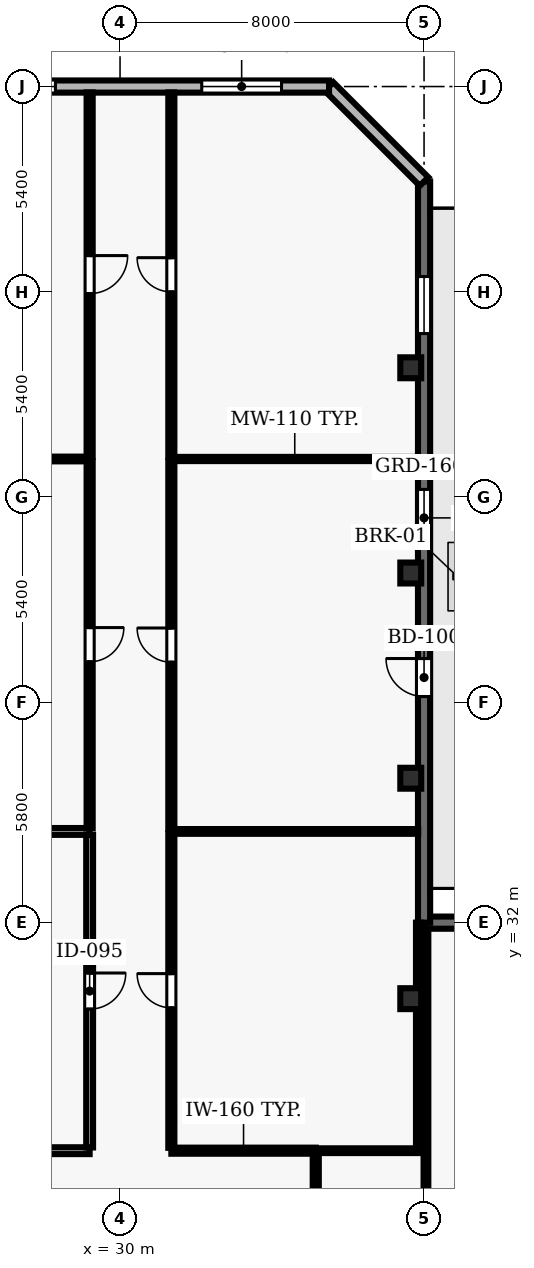
"""IFC4 building model, lengths in metres.
Left out: names, types, materials, properties, quantities, classifications, styles, units other than length and angle.
Written with IfcOpenShell. Run it as: python <this file> out.ifc"""

import sys

from ifc_helpers import new_model, si_unit, direction, frame, frame_2d, origin, origin_2d, place, context, subcontext, project, spatial, rectangle, hollow_rectangle, extrude, element, fill, save


model = new_model("IFC4")
c1 = context("Model", 3, precision=1e-05, world=origin(), true_north=direction((0.0, 1.0)))
c2 = subcontext(c1, "Body", "Model", "MODEL_VIEW")
j1 = project(units=[si_unit("LENGTHUNIT", "METRE"), si_unit("PLANEANGLEUNIT", "RADIAN")], contexts=[c1])
p1 = place(None, origin())
s1 = spatial("IfcSite", under=j1, at=p1, CompositionType="ELEMENT")
p2 = place(p1, origin())
s2 = spatial("IfcBuilding", under=s1, at=p2, CompositionType="ELEMENT")
p3 = place(p2, frame((0.0, 0.0, 26.0)))
s3 = spatial("IfcBuildingStorey", under=s2, at=p3, CompositionType="ELEMENT", Elevation=26.0)
for number, where, z_axis, x_axis in (
    (1, (37.65, 30.0, 0.0), (0.0, 0.0, 1.0), (1.0, 0.0, 0.0)),
    (2, (37.65, 35.8, 0.0), (0.0, 0.0, 1.0), (1.0, 0.0, 0.0)),
    (3, (37.65, 41.2, 0.0), (0.0, 0.0, 1.0), (1.0, 0.0, 0.0)),
    (4, (37.65, 46.6, 0.0), (0.0, 0.0, 1.0), (1.0, 0.0, 0.0)),
):
    element("IfcColumn", number, at=place(p3, frame(where, z_axis=z_axis, x_axis=x_axis)), inside=s3, PredefinedType="COLUMN", context=c2, shape_type="SweptSolid", body=[
        extrude(hollow_rectangle(XDim=0.55, YDim=0.55, WallThickness=0.025, at=origin_2d()), origin(), (0.0, 0.0, 1.0), 5.0),
    ])
p4 = place(p3, frame((52.8, 32.0, 0.0), z_axis=(0.0, 0.0, 1.0), x_axis=(-1.0, 0.0, 0.0)))
e5 = element("IfcWall", 5, at=p4, inside=s3, PredefinedType="SOLIDWALL", context=c2, shape_type="SweptSolid", body=[
    extrude(rectangle(XDim=14.8, YDim=0.32, at=frame_2d((7.4, 0.0))), origin(), (0.0, 0.0, 1.0), 4.79),
])
p5 = place(p4, frame((3.1, 0.0, 0.9)))
e6 = element("IfcOpeningElement", 6, at=p5, cuts=e5, PredefinedType="OPENING", context=c2, shape_type="SweptSolid", body=[
    extrude(rectangle(XDim=1.2, YDim=1.6, at=frame_2d((0.6, 0.8))), frame((0.0, 0.17, 0.0), z_axis=(0.0, -1.0, 0.0), x_axis=(1.0, 0.0, 0.0)), (0.0, 0.0, 1.0), 0.34),
])
p6 = place(p4, frame((10.5, 0.0, 0.9)))
e7 = element("IfcOpeningElement", 7, at=p6, cuts=e5, PredefinedType="OPENING", context=c2, shape_type="SweptSolid", body=[
    extrude(rectangle(XDim=1.2, YDim=1.6, at=frame_2d((0.6, 0.8))), frame((0.0, 0.17, 0.0), z_axis=(0.0, -1.0, 0.0), x_axis=(1.0, 0.0, 0.0)), (0.0, 0.0, 1.0), 0.34),
])
p7 = place(p3, frame((38.0, 32.0, 0.0), z_axis=(0.0, 0.0, 1.0), x_axis=(0.0, 1.0, 0.0)))
e8 = element("IfcWall", 8, at=p7, inside=s3, PredefinedType="SOLIDWALL", context=c2, shape_type="SweptSolid", body=[
    extrude(rectangle(XDim=19.5, YDim=0.32, at=frame_2d((9.75, 0.0))), origin(), (0.0, 0.0, 1.0), 4.79),
])
p8 = place(p7, frame((5.95, 0.0, 0.0)))
e9 = element("IfcOpeningElement", 9, at=p8, cuts=e8, PredefinedType="OPENING", context=c2, shape_type="SweptSolid", body=[
    extrude(rectangle(XDim=1.0, YDim=2.2, at=frame_2d((0.5, 1.1))), frame((0.0, 0.17, 0.0), z_axis=(0.0, -1.0, 0.0), x_axis=(1.0, 0.0, 0.0)), (0.0, 0.0, 1.0), 0.34),
])
p9 = place(p7, frame((9.9, 0.0, 0.9)))
e10 = element("IfcOpeningElement", 10, at=p9, cuts=e8, PredefinedType="OPENING", context=c2, shape_type="SweptSolid", body=[
    extrude(rectangle(XDim=1.5, YDim=1.6, at=frame_2d((0.75, 0.8))), frame((0.0, 0.17, 0.0), z_axis=(0.0, -1.0, 0.0), x_axis=(1.0, 0.0, 0.0)), (0.0, 0.0, 1.0), 0.34),
])
p10 = place(p7, frame((15.5, 0.0, 0.9)))
e11 = element("IfcOpeningElement", 11, at=p10, cuts=e8, PredefinedType="OPENING", context=c2, shape_type="SweptSolid", body=[
    extrude(rectangle(XDim=1.5, YDim=1.6, at=frame_2d((0.75, 0.8))), frame((0.0, 0.17, 0.0), z_axis=(0.0, -1.0, 0.0), x_axis=(1.0, 0.0, 0.0)), (0.0, 0.0, 1.0), 0.34),
])
p11 = place(p3, frame((38.0, 51.5, 0.0), z_axis=(0.0, 0.0, 1.0), x_axis=(-0.707106781187, 0.707106781187, 0.0)))
e12 = element("IfcWall", 12, at=p11, inside=s3, PredefinedType="SOLIDWALL", context=c2, shape_type="SweptSolid", body=[
    extrude(rectangle(XDim=3.536, YDim=0.32, at=frame_2d((1.768, 0.0))), origin(), (0.0, 0.0, 1.0), 4.79),
])
p12 = place(p3, frame((35.5, 54.0, 0.0), z_axis=(0.0, 0.0, 1.0), x_axis=(-1.0, 0.0, 0.0)))
e13 = element("IfcWall", 13, at=p12, inside=s3, PredefinedType="SOLIDWALL", context=c2, shape_type="SweptSolid", body=[
    extrude(rectangle(XDim=11.0, YDim=0.32, at=frame_2d((5.5, 0.0))), origin(), (0.0, 0.0, 1.0), 4.79),
])
p13 = place(p12, frame((1.25, 0.0, 0.9)))
e14 = element("IfcOpeningElement", 14, at=p13, cuts=e13, PredefinedType="OPENING", context=c2, shape_type="SweptSolid", body=[
    extrude(rectangle(XDim=2.1, YDim=1.6, at=frame_2d((1.05, 0.8))), frame((0.0, 0.17, 0.0), z_axis=(0.0, -1.0, 0.0), x_axis=(1.0, 0.0, 0.0)), (0.0, 0.0, 1.0), 0.34),
])
p14 = place(p12, frame((7.2, 0.0, 0.9)))
e15 = element("IfcOpeningElement", 15, at=p14, cuts=e13, PredefinedType="OPENING", context=c2, shape_type="SweptSolid", body=[
    extrude(rectangle(XDim=2.1, YDim=1.6, at=frame_2d((1.05, 0.8))), frame((0.0, 0.17, 0.0), z_axis=(0.0, -1.0, 0.0), x_axis=(1.0, 0.0, 0.0)), (0.0, 0.0, 1.0), 0.34),
])
for number, where, z_axis, x_axis in (
    (16, (29.2, 26.0, 0.0), (0.0, 0.0, 1.0), (-1.0, 0.0, 0.0)),
    (17, (29.2, 34.4, 0.0), (0.0, 0.0, 1.0), (-1.0, 0.0, 0.0)),
):
    element("IfcWall", number, at=place(p3, frame(where, z_axis=z_axis, x_axis=x_axis)), inside=s3, PredefinedType="PARTITIONING", context=c2, shape_type="SweptSolid", body=[
        extrude(rectangle(XDim=7.045, YDim=0.18, at=frame_2d((3.522, 0.0))), origin(), (0.0, 0.0, 1.0), 4.79),
    ])
p15 = place(p3, frame((29.2, 44.2, 0.0), z_axis=(0.0, 0.0, 1.0), x_axis=(-1.0, 0.0, 0.0)))
e18 = element("IfcWall", 18, at=p15, inside=s3, PredefinedType="PARTITIONING", context=c2, shape_type="SweptSolid", body=[
    extrude(rectangle(XDim=7.045, YDim=0.125, at=frame_2d((3.522, 0.0))), origin(), (0.0, 0.0, 1.0), 4.377),
])
p16 = place(p3, frame((35.15, 26.0, 0.0), z_axis=(0.0, 0.0, 1.0), x_axis=(-1.0, 0.0, 0.0)))
e19 = element("IfcWall", 19, at=p16, inside=s3, PredefinedType="PARTITIONING", context=c2, shape_type="SweptSolid", body=[
    extrude(rectangle(XDim=3.8, YDim=0.16, at=frame_2d((1.9, 0.0))), origin(), (0.0, 0.0, 1.0), 4.79),
])
p17 = place(p3, frame((35.15, 26.0, 0.0), z_axis=(0.0, 0.0, 1.0), x_axis=(1.0, 0.0, 0.0)))
e20 = element("IfcWall", 20, at=p17, inside=s3, PredefinedType="PARTITIONING", context=c2, shape_type="SweptSolid", body=[
    extrude(rectangle(XDim=2.7, YDim=0.125, at=frame_2d((1.35, 0.0))), origin(), (0.0, 0.0, 1.0), 4.79),
])
p18 = place(p3, frame((37.845, 34.4, 0.0), z_axis=(0.0, 0.0, 1.0), x_axis=(-1.0, 0.0, 0.0)))
e21 = element("IfcWall", 21, at=p18, inside=s3, PredefinedType="PARTITIONING", context=c2, shape_type="SweptSolid", body=[
    extrude(rectangle(XDim=6.495, YDim=0.125, at=frame_2d((3.248, 0.0))), origin(), (0.0, 0.0, 1.0), 4.79),
])
p19 = place(p3, frame((37.845, 44.2, 0.0), z_axis=(0.0, 0.0, 1.0), x_axis=(-1.0, 0.0, 0.0)))
e22 = element("IfcWall", 22, at=p19, inside=s3, PredefinedType="MOVABLE", context=c2, shape_type="SweptSolid", body=[
    extrude(rectangle(XDim=6.495, YDim=0.11, at=frame_2d((3.248, 0.0))), origin(), (0.0, 0.0, 1.0), 4.377),
])
p20 = place(p3, frame((29.2, 34.315, 0.0), z_axis=(0.0, 0.0, 1.0), x_axis=(0.0, -1.0, 0.0)))
e23 = element("IfcWall", 23, at=p20, inside=s3, PredefinedType="PARTITIONING", context=c2, shape_type="SweptSolid", body=[
    extrude(rectangle(XDim=8.23, YDim=0.18, at=frame_2d((4.115, 0.0))), origin(), (0.0, 0.0, 1.0), 4.79),
])
p21 = place(p20, frame((3.64, 0.0, 0.0)))
e24 = element("IfcOpeningElement", 24, at=p21, cuts=e23, PredefinedType="OPENING", context=c2, shape_type="SweptSolid", body=[
    extrude(rectangle(XDim=0.95, YDim=2.1, at=frame_2d((0.475, 1.05))), frame((0.0, 0.1, 0.0), z_axis=(0.0, -1.0, 0.0), x_axis=(1.0, 0.0, 0.0)), (0.0, 0.0, 1.0), 0.2),
])
p22 = place(p3, frame((29.2, 44.143, 0.0), z_axis=(0.0, 0.0, 1.0), x_axis=(0.0, -1.0, 0.0)))
e25 = element("IfcWall", 25, at=p22, inside=s3, PredefinedType="PARTITIONING", context=c2, shape_type="SweptSolid", body=[
    extrude(rectangle(XDim=9.658, YDim=0.16, at=frame_2d((4.829, 0.0))), origin(), (0.0, 0.0, 1.0), 4.79),
])
p23 = place(p22, frame((4.379, 0.0, 0.0)))
e26 = element("IfcOpeningElement", 26, at=p23, cuts=e25, PredefinedType="OPENING", context=c2, shape_type="SweptSolid", body=[
    extrude(rectangle(XDim=0.9, YDim=2.1, at=frame_2d((0.45, 1.05))), frame((0.0, 0.09, 0.0), z_axis=(0.0, -1.0, 0.0), x_axis=(1.0, 0.0, 0.0)), (0.0, 0.0, 1.0), 0.18),
])
p24 = place(p3, frame((29.2, 53.845, 0.0), z_axis=(0.0, 0.0, 1.0), x_axis=(0.0, -1.0, 0.0)))
e27 = element("IfcWall", 27, at=p24, inside=s3, PredefinedType="PARTITIONING", context=c2, shape_type="SweptSolid", body=[
    extrude(rectangle(XDim=9.587, YDim=0.16, at=frame_2d((4.793, 0.0))), origin(), (0.0, 0.0, 1.0), 4.79),
])
p25 = place(p24, frame((4.293, 0.0, 0.0)))
e28 = element("IfcOpeningElement", 28, at=p25, cuts=e27, PredefinedType="OPENING", context=c2, shape_type="SweptSolid", body=[
    extrude(rectangle(XDim=1.0, YDim=2.1, at=frame_2d((0.5, 1.05))), frame((0.0, 0.09, 0.0), z_axis=(0.0, -1.0, 0.0), x_axis=(1.0, 0.0, 0.0)), (0.0, 0.0, 1.0), 0.18),
])
p26 = place(p3, frame((31.35, 26.075, 0.0), z_axis=(0.0, 0.0, 1.0), x_axis=(0.0, 1.0, 0.0)))
e29 = element("IfcWall", 29, at=p26, inside=s3, PredefinedType="PARTITIONING", context=c2, shape_type="SweptSolid", body=[
    extrude(rectangle(XDim=8.268, YDim=0.16, at=frame_2d((4.134, 0.0))), origin(), (0.0, 0.0, 1.0), 4.79),
])
p27 = place(p26, frame((3.684, 0.0, 0.0)))
e30 = element("IfcOpeningElement", 30, at=p27, cuts=e29, PredefinedType="OPENING", context=c2, shape_type="SweptSolid", body=[
    extrude(rectangle(XDim=0.9, YDim=2.1, at=frame_2d((0.45, 1.05))), frame((0.0, 0.09, 0.0), z_axis=(0.0, -1.0, 0.0), x_axis=(1.0, 0.0, 0.0)), (0.0, 0.0, 1.0), 0.18),
])
p28 = place(p3, frame((31.35, 34.457, 0.0), z_axis=(0.0, 0.0, 1.0), x_axis=(0.0, 1.0, 0.0)))
e31 = element("IfcWall", 31, at=p28, inside=s3, PredefinedType="PARTITIONING", context=c2, shape_type="SweptSolid", body=[
    extrude(rectangle(XDim=9.693, YDim=0.16, at=frame_2d((4.846, 0.0))), origin(), (0.0, 0.0, 1.0), 4.79),
])
p29 = place(p28, frame((4.396, 0.0, 0.0)))
e32 = element("IfcOpeningElement", 32, at=p29, cuts=e31, PredefinedType="OPENING", context=c2, shape_type="SweptSolid", body=[
    extrude(rectangle(XDim=0.9, YDim=2.1, at=frame_2d((0.45, 1.05))), frame((0.0, 0.09, 0.0), z_axis=(0.0, -1.0, 0.0), x_axis=(1.0, 0.0, 0.0)), (0.0, 0.0, 1.0), 0.18),
])
p30 = place(p3, frame((31.35, 44.25, 0.0), z_axis=(0.0, 0.0, 1.0), x_axis=(0.0, 1.0, 0.0)))
e33 = element("IfcWall", 33, at=p30, inside=s3, PredefinedType="PARTITIONING", context=c2, shape_type="SweptSolid", body=[
    extrude(rectangle(XDim=9.595, YDim=0.16, at=frame_2d((4.797, 0.0))), origin(), (0.0, 0.0, 1.0), 4.79),
])
p31 = place(p30, frame((4.347, 0.0, 0.0)))
e34 = element("IfcOpeningElement", 34, at=p31, cuts=e33, PredefinedType="OPENING", context=c2, shape_type="SweptSolid", body=[
    extrude(rectangle(XDim=0.9, YDim=2.1, at=frame_2d((0.45, 1.05))), frame((0.0, 0.09, 0.0), z_axis=(0.0, -1.0, 0.0), x_axis=(1.0, 0.0, 0.0)), (0.0, 0.0, 1.0), 0.18),
])
p32 = place(p3, frame((35.15, 24.07, 0.0), z_axis=(0.0, 0.0, 1.0), x_axis=(0.0, 1.0, 0.0)))
e35 = element("IfcWall", 35, at=p32, inside=s3, PredefinedType="PARTITIONING", context=c2, shape_type="SweptSolid", body=[
    extrude(rectangle(XDim=1.855, YDim=0.16, at=frame_2d((0.927, 0.0))), origin(), (0.0, 0.0, 1.0), 4.79),
])
p33 = place(p3, frame((37.85, 26.058, 0.0), z_axis=(0.0, 0.0, 1.0), x_axis=(0.0, 1.0, 0.0)))
e36 = element("IfcWall", 36, at=p33, inside=s3, PredefinedType="PARTITIONING", context=c2, shape_type="SweptSolid", body=[
    extrude(rectangle(XDim=5.942, YDim=0.125, at=frame_2d((2.971, 0.0))), origin(), (0.0, 0.0, 1.0), 4.155),
])
p34 = place(p3, frame((38.05, 31.845, 0.0), z_axis=(0.0, 0.0, 1.0), x_axis=(0.0, -1.0, 0.0)))
e37 = element("IfcWall", 37, at=p34, inside=s3, PredefinedType="PARTITIONING", context=c2, shape_type="SweptSolid", body=[
    extrude(rectangle(XDim=7.795, YDim=0.125, at=frame_2d((3.897, 0.0))), origin(), (0.0, 0.0, 1.0), 4.155),
])
p35 = place(p8, origin())
e38 = element("IfcDoor", 38, at=p35, inside=s3, OperationType="SINGLE_SWING_RIGHT", PredefinedType="DOOR", context=c2, shape_type="SweptSolid", body=[
    extrude(rectangle(XDim=1.0, YDim=2.2, at=frame_2d((0.5, 1.1))), frame((0.0, 0.025, 0.0), z_axis=(0.0, -1.0, 0.0), x_axis=(1.0, 0.0, 0.0)), (0.0, 0.0, 1.0), 0.05),
])
fill(e9, e38)
p36 = place(p9, origin())
e39 = element("IfcWindow", 39, at=p36, inside=s3, PartitioningType="SINGLE_PANEL", PredefinedType="WINDOW", context=c2, shape_type="SweptSolid", body=[
    extrude(rectangle(XDim=1.5, YDim=1.6, at=frame_2d((0.75, 0.8))), frame((0.0, 0.03, 0.0), z_axis=(0.0, -1.0, 0.0), x_axis=(1.0, 0.0, 0.0)), (0.0, 0.0, 1.0), 0.06),
])
fill(e10, e39)
p37 = place(p10, origin())
e40 = element("IfcWindow", 40, at=p37, inside=s3, PartitioningType="SINGLE_PANEL", PredefinedType="WINDOW", context=c2, shape_type="SweptSolid", body=[
    extrude(rectangle(XDim=1.5, YDim=1.6, at=frame_2d((0.75, 0.8))), frame((0.0, 0.03, 0.0), z_axis=(0.0, -1.0, 0.0), x_axis=(1.0, 0.0, 0.0)), (0.0, 0.0, 1.0), 0.06),
])
fill(e11, e40)
p38 = place(p13, origin())
e41 = element("IfcWindow", 41, at=p38, inside=s3, PartitioningType="SINGLE_PANEL", PredefinedType="WINDOW", context=c2, shape_type="SweptSolid", body=[
    extrude(rectangle(XDim=2.1, YDim=1.6, at=frame_2d((1.05, 0.8))), frame((0.0, 0.03, 0.0), z_axis=(0.0, -1.0, 0.0), x_axis=(1.0, 0.0, 0.0)), (0.0, 0.0, 1.0), 0.06),
])
fill(e14, e41)
p39 = place(p14, origin())
e42 = element("IfcWindow", 42, at=p39, inside=s3, PartitioningType="SINGLE_PANEL", PredefinedType="WINDOW", context=c2, shape_type="SweptSolid", body=[
    extrude(rectangle(XDim=2.1, YDim=1.6, at=frame_2d((1.05, 0.8))), frame((0.0, 0.03, 0.0), z_axis=(0.0, -1.0, 0.0), x_axis=(1.0, 0.0, 0.0)), (0.0, 0.0, 1.0), 0.06),
])
fill(e15, e42)
p40 = place(p21, origin())
e43 = element("IfcDoor", 43, at=p40, inside=s3, OperationType="SINGLE_SWING_LEFT", PredefinedType="DOOR", context=c2, shape_type="SweptSolid", body=[
    extrude(rectangle(XDim=0.95, YDim=2.1, at=frame_2d((0.475, 1.05))), frame((0.0, 0.025, 0.0), z_axis=(0.0, -1.0, 0.0), x_axis=(1.0, 0.0, 0.0)), (0.0, 0.0, 1.0), 0.05),
])
fill(e24, e43)
p41 = place(p27, origin())
e44 = element("IfcDoor", 44, at=p41, inside=s3, OperationType="SINGLE_SWING_RIGHT", PredefinedType="DOOR", context=c2, shape_type="SweptSolid", body=[
    extrude(rectangle(XDim=0.9, YDim=2.1, at=frame_2d((0.45, 1.05))), frame((0.0, 0.025, 0.0), z_axis=(0.0, -1.0, 0.0), x_axis=(1.0, 0.0, 0.0)), (0.0, 0.0, 1.0), 0.05),
])
fill(e30, e44)
p42 = place(p23, origin())
e45 = element("IfcDoor", 45, at=p42, inside=s3, OperationType="SINGLE_SWING_LEFT", PredefinedType="DOOR", context=c2, shape_type="SweptSolid", body=[
    extrude(rectangle(XDim=0.9, YDim=2.1, at=frame_2d((0.45, 1.05))), frame((0.0, 0.025, 0.0), z_axis=(0.0, -1.0, 0.0), x_axis=(1.0, 0.0, 0.0)), (0.0, 0.0, 1.0), 0.05),
])
fill(e26, e45)
p43 = place(p29, origin())
e46 = element("IfcDoor", 46, at=p43, inside=s3, OperationType="SINGLE_SWING_RIGHT", PredefinedType="DOOR", context=c2, shape_type="SweptSolid", body=[
    extrude(rectangle(XDim=0.9, YDim=2.1, at=frame_2d((0.45, 1.05))), frame((0.0, 0.025, 0.0), z_axis=(0.0, -1.0, 0.0), x_axis=(1.0, 0.0, 0.0)), (0.0, 0.0, 1.0), 0.05),
])
fill(e32, e46)
p44 = place(p25, origin())
e47 = element("IfcDoor", 47, at=p44, inside=s3, OperationType="SINGLE_SWING_LEFT", PredefinedType="DOOR", context=c2, shape_type="SweptSolid", body=[
    extrude(rectangle(XDim=1.0, YDim=2.1, at=frame_2d((0.5, 1.05))), frame((0.0, 0.025, 0.0), z_axis=(0.0, -1.0, 0.0), x_axis=(1.0, 0.0, 0.0)), (0.0, 0.0, 1.0), 0.05),
])
fill(e28, e47)
p45 = place(p31, origin())
e48 = element("IfcDoor", 48, at=p45, inside=s3, OperationType="SINGLE_SWING_RIGHT", PredefinedType="DOOR", context=c2, shape_type="SweptSolid", body=[
    extrude(rectangle(XDim=0.9, YDim=2.1, at=frame_2d((0.45, 1.05))), frame((0.0, 0.025, 0.0), z_axis=(0.0, -1.0, 0.0), x_axis=(1.0, 0.0, 0.0)), (0.0, 0.0, 1.0), 0.05),
])
fill(e34, e48)
save(model, sys.argv[1])
